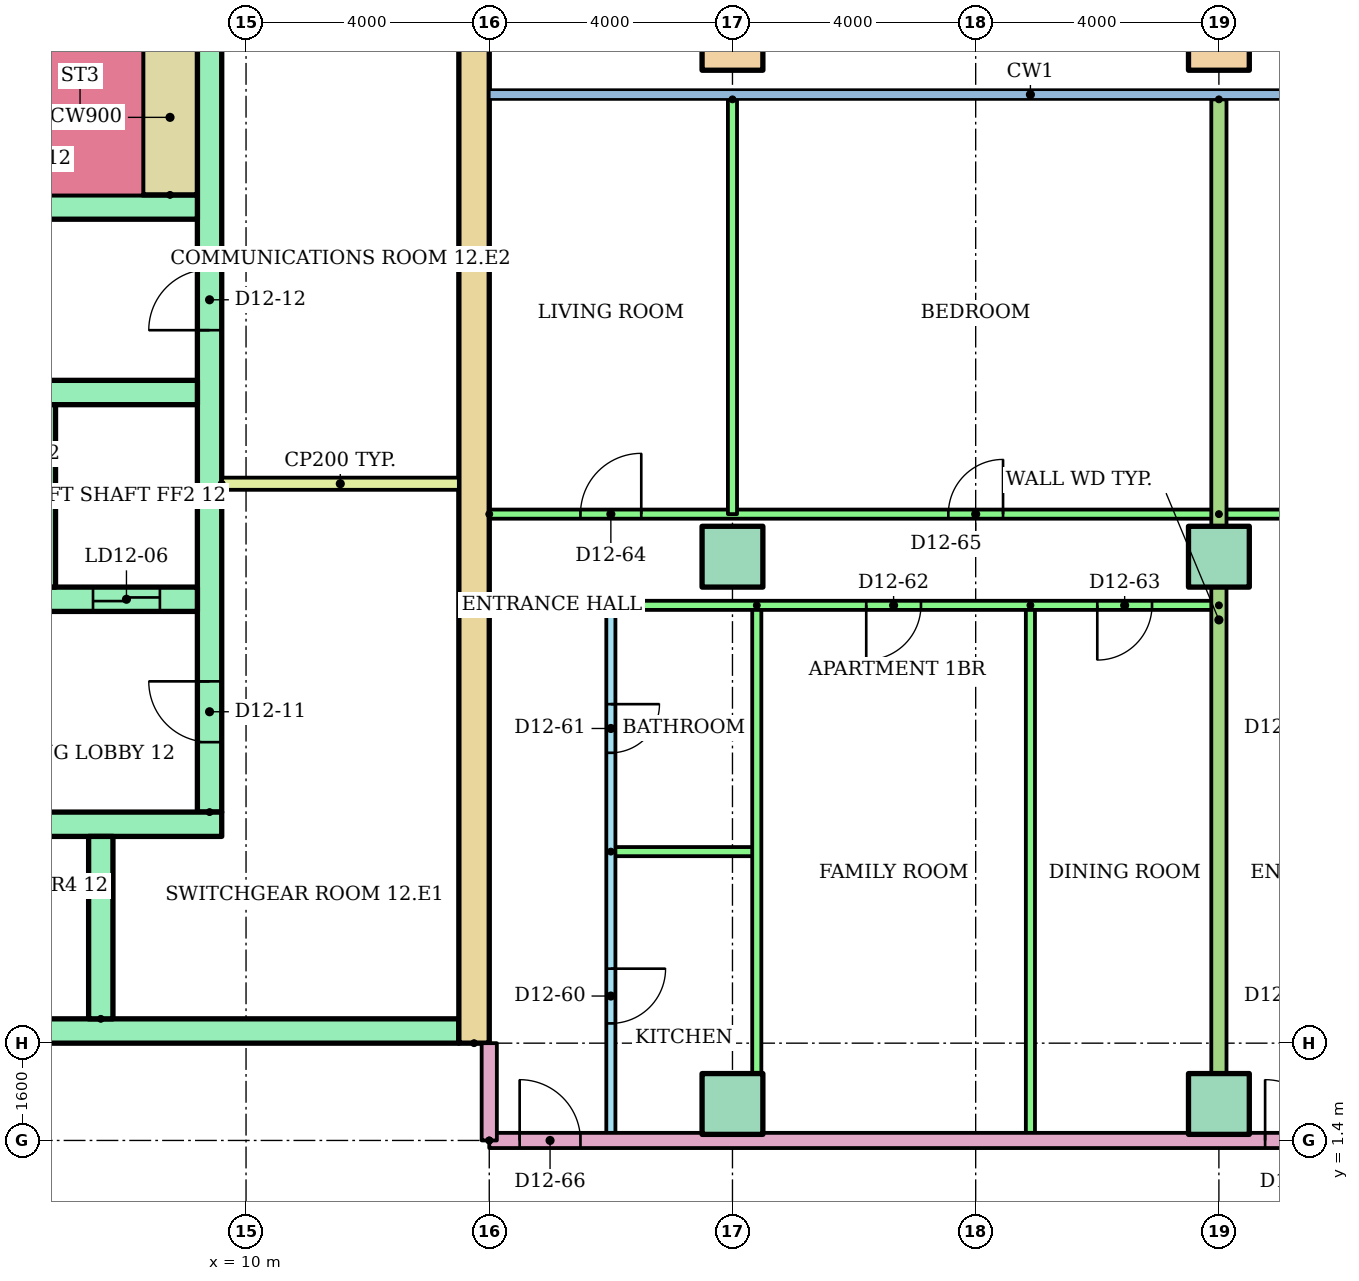
"""IFC4 building model, lengths in metres.
Left out: names, types, materials, properties, quantities, classifications, styles, units other than length and angle.
Written with IfcOpenShell. Run it as: python <this file> out.ifc"""

import sys

from ifc_helpers import new_model, si_unit, direction, frame, frame_2d, origin, origin_2d, place, context, subcontext, project, spatial, rectangle, hollow_rectangle, extrude, element, fill, save


model = new_model("IFC4")
c1 = context("Model", 3, precision=1e-05, world=origin(), true_north=direction((0.0, 1.0)))
c2 = subcontext(c1, "Body", "Model", "MODEL_VIEW")
j1 = project(units=[si_unit("LENGTHUNIT", "METRE"), si_unit("PLANEANGLEUNIT", "RADIAN")], contexts=[c1])
p1 = place(None, origin())
s1 = spatial("IfcSite", under=j1, at=p1, CompositionType="ELEMENT")
p2 = place(p1, origin())
s2 = spatial("IfcBuilding", under=s1, at=p2, CompositionType="ELEMENT")
p3 = place(p2, frame((0.0, 0.0, 48.0)))
s3 = spatial("IfcBuildingStorey", under=s2, at=p3, CompositionType="ELEMENT", Elevation=48.0)
for number, where in (
    (1, (18.0, 2.0, 0.0)),
    (2, (26.0, 2.0, 0.0)),
    (3, (18.0, 11.0, 0.0)),
    (4, (26.0, 11.0, 0.0)),
):
    element("IfcColumn", number, at=place(p3, frame(where)), inside=s3, PredefinedType="COLUMN", context=c2, shape_type="SweptSolid", body=[
        extrude(rectangle(XDim=1.0, YDim=1.0, at=origin_2d()), origin(), (0.0, 0.0, 1.0), 3.2),
    ])
for number, where in (
    (5, (18.0, 19.5, 0.0)),
    (6, (26.0, 19.5, 0.0)),
):
    element("IfcColumn", number, at=place(p3, frame(where)), inside=s3, PredefinedType="COLUMN", context=c2, shape_type="SweptSolid", body=[
        extrude(hollow_rectangle(XDim=1.0, YDim=1.0, WallThickness=0.05, at=origin_2d()), origin(), (0.0, 0.0, 1.0), 3.2),
    ])
p4 = place(p3, frame((13.75, 3.0, 0.0), z_axis=(0.0, 0.0, 1.0), x_axis=(0.0, 1.0, 0.0)))
e7 = element("IfcWall", 7, at=p4, inside=s3, PredefinedType="SHEAR", context=c2, shape_type="SweptSolid", body=[
    extrude(rectangle(XDim=17.0, YDim=0.5, at=frame_2d((8.5, 0.0))), origin(), (0.0, 0.0, 1.0), 2.92),
])
p5 = place(p3, frame((9.4, 6.8, 0.0), z_axis=(0.0, 0.0, 1.0), x_axis=(0.0, 1.0, 0.0)))
e8 = element("IfcWall", 8, at=p5, inside=s3, PredefinedType="SHEAR", context=c2, shape_type="SweptSolid", body=[
    extrude(rectangle(XDim=12.7, YDim=0.4, at=frame_2d((6.35, 0.0))), origin(), (0.0, 0.0, 1.0), 2.92),
])
p6 = place(p5, frame((1.15, 0.0, 0.0)))
e9 = element("IfcOpeningElement", 9, at=p6, cuts=e8, PredefinedType="OPENING", context=c2, shape_type="SweptSolid", body=[
    extrude(rectangle(XDim=1.0, YDim=2.1, at=frame_2d((0.5, 1.05))), frame((0.0, 0.21, 0.0), z_axis=(0.0, -1.0, 0.0), x_axis=(1.0, 0.0, 0.0)), (0.0, 0.0, 1.0), 0.42),
])
p7 = place(p5, frame((7.925, 0.0, 0.0)))
e10 = element("IfcOpeningElement", 10, at=p7, cuts=e8, PredefinedType="OPENING", context=c2, shape_type="SweptSolid", body=[
    extrude(rectangle(XDim=1.0, YDim=2.1, at=frame_2d((0.5, 1.05))), frame((0.0, 0.21, 0.0), z_axis=(0.0, -1.0, 0.0), x_axis=(1.0, 0.0, 0.0)), (0.0, 0.0, 1.0), 0.42),
])
p8 = place(p3, frame((-13.5, 3.2, 0.0)))
e11 = element("IfcWall", 11, at=p8, inside=s3, PredefinedType="SHEAR", context=c2, shape_type="SweptSolid", body=[
    extrude(rectangle(XDim=27.0, YDim=0.4, at=frame_2d((13.5, 0.0))), origin(), (0.0, 0.0, 1.0), 2.92),
])
p9 = place(p8, frame((6.861, 0.0, 0.0)))
e12 = element("IfcOpeningElement", 12, at=p9, cuts=e11, PredefinedType="OPENING", context=c2, shape_type="SweptSolid", body=[
    extrude(rectangle(XDim=1.1, YDim=2.1, at=frame_2d((0.55, 1.05))), frame((0.0, 0.21, 0.0), z_axis=(0.0, -1.0, 0.0), x_axis=(1.0, 0.0, 0.0)), (0.0, 0.0, 1.0), 0.42),
])
p10 = place(p8, frame((9.906, 0.0, 0.0)))
e13 = element("IfcOpeningElement", 13, at=p10, cuts=e11, PredefinedType="OPENING", context=c2, shape_type="SweptSolid", body=[
    extrude(rectangle(XDim=1.1, YDim=2.1, at=frame_2d((0.55, 1.05))), frame((0.0, 0.21, 0.0), z_axis=(0.0, -1.0, 0.0), x_axis=(1.0, 0.0, 0.0)), (0.0, 0.0, 1.0), 0.42),
])
p11 = place(p8, frame((15.994, 0.0, 0.0)))
e14 = element("IfcOpeningElement", 14, at=p11, cuts=e11, PredefinedType="OPENING", context=c2, shape_type="SweptSolid", body=[
    extrude(rectangle(XDim=1.1, YDim=2.1, at=frame_2d((0.55, 1.05))), frame((0.0, 0.21, 0.0), z_axis=(0.0, -1.0, 0.0), x_axis=(1.0, 0.0, 0.0)), (0.0, 0.0, 1.0), 0.42),
])
p12 = place(p8, frame((19.039, 0.0, 0.0)))
e15 = element("IfcOpeningElement", 15, at=p12, cuts=e11, PredefinedType="OPENING", context=c2, shape_type="SweptSolid", body=[
    extrude(rectangle(XDim=1.1, YDim=2.1, at=frame_2d((0.55, 1.05))), frame((0.0, 0.21, 0.0), z_axis=(0.0, -1.0, 0.0), x_axis=(1.0, 0.0, 0.0)), (0.0, 0.0, 1.0), 0.42),
])
p13 = place(p8, frame((12.6, 0.0, 0.0)))
e16 = element("IfcOpeningElement", 16, at=p13, cuts=e11, PredefinedType="OPENING", context=c2, shape_type="SweptSolid", body=[
    extrude(rectangle(XDim=1.8, YDim=2.1, at=frame_2d((0.9, 1.05))), frame((0.0, 0.21, 0.0), z_axis=(0.0, -1.0, 0.0), x_axis=(1.0, 0.0, 0.0)), (0.0, 0.0, 1.0), 0.42),
])
p14 = place(p3, frame((1.522, 6.6, 0.0)))
e17 = element("IfcWall", 17, at=p14, inside=s3, PredefinedType="SHEAR", context=c2, shape_type="SweptSolid", body=[
    extrude(rectangle(XDim=8.078, YDim=0.4, at=frame_2d((4.039, 0.0))), origin(), (0.0, 0.0, 1.0), 2.92),
])
p15 = place(p3, frame((7.611, 3.4, 0.0), z_axis=(0.0, 0.0, 1.0), x_axis=(0.0, 1.0, 0.0)))
e18 = element("IfcWall", 18, at=p15, inside=s3, PredefinedType="SHEAR", context=c2, shape_type="SweptSolid", body=[
    extrude(rectangle(XDim=3.0, YDim=0.4, at=frame_2d((1.5, 0.0))), origin(), (0.0, 0.0, 1.0), 2.92),
])
p16 = place(p3, frame((1.2, 10.3, 0.0)))
e19 = element("IfcWall", 19, at=p16, inside=s3, PredefinedType="SHEAR", context=c2, shape_type="SweptSolid", body=[
    extrude(rectangle(XDim=8.0, YDim=0.4, at=frame_2d((4.0, 0.0))), origin(), (0.0, 0.0, 1.0), 2.92),
])
p17 = place(p16, frame((3.55, 0.0, 0.0)))
e20 = element("IfcOpeningElement", 20, at=p17, cuts=e19, PredefinedType="OPENING", context=c2, shape_type="SweptSolid", body=[
    extrude(rectangle(XDim=1.1, YDim=2.1, at=frame_2d((0.55, 1.05))), frame((0.0, 0.21, 0.0), z_axis=(0.0, -1.0, 0.0), x_axis=(1.0, 0.0, 0.0)), (0.0, 0.0, 1.0), 0.42),
])
p18 = place(p16, frame((6.283, 0.0, 0.0)))
e21 = element("IfcOpeningElement", 21, at=p18, cuts=e19, PredefinedType="OPENING", context=c2, shape_type="SweptSolid", body=[
    extrude(rectangle(XDim=1.1, YDim=2.1, at=frame_2d((0.55, 1.05))), frame((0.0, 0.21, 0.0), z_axis=(0.0, -1.0, 0.0), x_axis=(1.0, 0.0, 0.0)), (0.0, 0.0, 1.0), 0.42),
])
p19 = place(p16, frame((0.867, 0.0, 0.0)))
e22 = element("IfcOpeningElement", 22, at=p19, cuts=e19, PredefinedType="OPENING", context=c2, shape_type="SweptSolid", body=[
    extrude(rectangle(XDim=1.0, YDim=2.1, at=frame_2d((0.5, 1.05))), frame((0.0, 0.21, 0.0), z_axis=(0.0, -1.0, 0.0), x_axis=(1.0, 0.0, 0.0)), (0.0, 0.0, 1.0), 0.42),
])
p20 = place(p3, frame((1.2, 13.7, 0.0)))
e23 = element("IfcWall", 23, at=p20, inside=s3, PredefinedType="SHEAR", context=c2, shape_type="SweptSolid", body=[
    extrude(rectangle(XDim=8.0, YDim=0.4, at=frame_2d((4.0, 0.0))), origin(), (0.0, 0.0, 1.0), 2.92),
])
p21 = place(p3, frame((6.667, 10.5, 0.0), z_axis=(0.0, 0.0, 1.0), x_axis=(0.0, 1.0, 0.0)))
e24 = element("IfcWall", 24, at=p21, inside=s3, PredefinedType="SHEAR", context=c2, shape_type="SweptSolid", body=[
    extrude(rectangle(XDim=3.0, YDim=0.4, at=frame_2d((1.5, 0.0))), origin(), (0.0, 0.0, 1.0), 2.92),
])
p22 = place(p3, frame((-9.2, 16.75, 0.0)))
e25 = element("IfcWall", 25, at=p22, inside=s3, PredefinedType="SHEAR", context=c2, shape_type="SweptSolid", body=[
    extrude(rectangle(XDim=18.4, YDim=0.4, at=frame_2d((9.2, 0.0))), origin(), (0.0, 0.0, 1.0), 2.92),
])
p23 = place(p22, frame((0.1, 0.0, 0.0)))
e26 = element("IfcOpeningElement", 26, at=p23, cuts=e25, PredefinedType="OPENING", context=c2, shape_type="SweptSolid", body=[
    extrude(rectangle(XDim=0.95, YDim=2.1, at=frame_2d((0.475, 1.05))), frame((0.0, 0.21, 0.0), z_axis=(0.0, -1.0, 0.0), x_axis=(1.0, 0.0, 0.0)), (0.0, 0.0, 1.0), 0.42),
])
p24 = place(p22, frame((6.1, 0.0, 0.0)))
e27 = element("IfcOpeningElement", 27, at=p24, cuts=e25, PredefinedType="OPENING", context=c2, shape_type="SweptSolid", body=[
    extrude(rectangle(XDim=0.95, YDim=2.1, at=frame_2d((0.475, 1.05))), frame((0.0, 0.21, 0.0), z_axis=(0.0, -1.0, 0.0), x_axis=(1.0, 0.0, 0.0)), (0.0, 0.0, 1.0), 0.42),
])
p25 = place(p22, frame((12.1, 0.0, 0.0)))
e28 = element("IfcOpeningElement", 28, at=p25, cuts=e25, PredefinedType="OPENING", context=c2, shape_type="SweptSolid", body=[
    extrude(rectangle(XDim=0.95, YDim=2.1, at=frame_2d((0.475, 1.05))), frame((0.0, 0.21, 0.0), z_axis=(0.0, -1.0, 0.0), x_axis=(1.0, 0.0, 0.0)), (0.0, 0.0, 1.0), 0.42),
])
p26 = place(p3, frame((8.75, 16.95, 0.0), z_axis=(0.0, 0.0, 1.0), x_axis=(0.0, 1.0, 0.0)))
e29 = element("IfcWall", 29, at=p26, inside=s3, PredefinedType="SHEAR", context=c2, shape_type="SweptSolid", body=[
    extrude(rectangle(XDim=2.55, YDim=0.9, at=frame_2d((1.275, 0.0))), origin(), (0.0, 0.0, 1.0), 2.92),
])
p27 = place(p3, frame((9.6, 12.2, 0.0)))
e30 = element("IfcWall", 30, at=p27, inside=s3, PredefinedType="PARTITIONING", context=c2, shape_type="SweptSolid", body=[
    extrude(rectangle(XDim=3.9, YDim=0.2, at=frame_2d((1.95, 0.0))), origin(), (0.0, 0.0, 1.0), 2.92),
])
p28 = place(p3, frame((16.0, 10.2, 0.0), z_axis=(0.0, 0.0, 1.0), x_axis=(0.0, -1.0, 0.0)))
e31 = element("IfcWall", 31, at=p28, inside=s3, PredefinedType="PARTITIONING", context=c2, shape_type="SweptSolid", body=[
    extrude(rectangle(XDim=8.8, YDim=0.15, at=frame_2d((4.4, 0.0))), origin(), (0.0, 0.0, 1.0), 2.4),
])
p29 = place(p28, frame((5.975, 0.0, 0.0)))
e32 = element("IfcOpeningElement", 32, at=p29, cuts=e31, PredefinedType="OPENING", context=c2, shape_type="SweptSolid", body=[
    extrude(rectangle(XDim=0.9, YDim=2.1, at=frame_2d((0.45, 1.05))), frame((0.0, 0.085, 0.0), z_axis=(0.0, -1.0, 0.0), x_axis=(1.0, 0.0, 0.0)), (0.0, 0.0, 1.0), 0.17),
])
p30 = place(p28, frame((1.625, 0.0, 0.0)))
e33 = element("IfcOpeningElement", 33, at=p30, cuts=e31, PredefinedType="OPENING", context=c2, shape_type="SweptSolid", body=[
    extrude(rectangle(XDim=0.8, YDim=2.1, at=frame_2d((0.4, 1.05))), frame((0.0, 0.085, 0.0), z_axis=(0.0, -1.0, 0.0), x_axis=(1.0, 0.0, 0.0)), (0.0, 0.0, 1.0), 0.17),
])
p31 = place(p3, frame((16.0, 6.15, 0.0)))
e34 = element("IfcWall", 34, at=p31, inside=s3, PredefinedType="PARTITIONING", context=c2, shape_type="SweptSolid", body=[
    extrude(rectangle(XDim=2.4, YDim=0.15, at=frame_2d((1.2, 0.0))), origin(), (0.0, 0.0, 1.0), 2.4),
])
for number, where, z_axis, x_axis in (
    (35, (18.4, 10.2, 0.0), (0.0, 0.0, 1.0), (0.0, -1.0, 0.0)),
    (36, (22.9, 10.2, 0.0), (0.0, 0.0, 1.0), (0.0, -1.0, 0.0)),
):
    element("IfcWall", number, at=place(p3, frame(where, z_axis=z_axis, x_axis=x_axis)), inside=s3, PredefinedType="PARTITIONING", context=c2, shape_type="SweptSolid", body=[
        extrude(rectangle(XDim=8.8, YDim=0.15, at=frame_2d((4.4, 0.0))), origin(), (0.0, 0.0, 1.0), 2.4),
    ])
p32 = place(p3, frame((26.0, 10.2, 0.0), z_axis=(0.0, 0.0, 1.0), x_axis=(-1.0, 0.0, 0.0)))
e37 = element("IfcWall", 37, at=p32, inside=s3, PredefinedType="PARTITIONING", context=c2, shape_type="SweptSolid", body=[
    extrude(rectangle(XDim=10.0, YDim=0.15, at=frame_2d((5.0, 0.0))), origin(), (0.0, 0.0, 1.0), 2.4),
])
p33 = place(p32, frame((4.9, 0.0, 0.0)))
e38 = element("IfcOpeningElement", 38, at=p33, cuts=e37, PredefinedType="OPENING", context=c2, shape_type="SweptSolid", body=[
    extrude(rectangle(XDim=0.9, YDim=2.1, at=frame_2d((0.45, 1.05))), frame((0.0, 0.085, 0.0), z_axis=(0.0, -1.0, 0.0), x_axis=(1.0, 0.0, 0.0)), (0.0, 0.0, 1.0), 0.17),
])
p34 = place(p32, frame((1.1, 0.0, 0.0)))
e39 = element("IfcOpeningElement", 39, at=p34, cuts=e37, PredefinedType="OPENING", context=c2, shape_type="SweptSolid", body=[
    extrude(rectangle(XDim=0.9, YDim=2.1, at=frame_2d((0.45, 1.05))), frame((0.0, 0.085, 0.0), z_axis=(0.0, -1.0, 0.0), x_axis=(1.0, 0.0, 0.0)), (0.0, 0.0, 1.0), 0.17),
])
p35 = place(p3, frame((14.0, 11.7, 0.0)))
e40 = element("IfcWall", 40, at=p35, inside=s3, PredefinedType="PARTITIONING", context=c2, shape_type="SweptSolid", body=[
    extrude(rectangle(XDim=12.0, YDim=0.15, at=frame_2d((6.0, 0.0))), origin(), (0.0, 0.0, 1.0), 2.4),
])
p36 = place(p35, frame((1.5, 0.0, 0.0)))
e41 = element("IfcOpeningElement", 41, at=p36, cuts=e40, PredefinedType="OPENING", context=c2, shape_type="SweptSolid", body=[
    extrude(rectangle(XDim=1.0, YDim=2.1, at=frame_2d((0.5, 1.05))), frame((0.0, 0.085, 0.0), z_axis=(0.0, -1.0, 0.0), x_axis=(1.0, 0.0, 0.0)), (0.0, 0.0, 1.0), 0.17),
])
p37 = place(p35, frame((7.55, 0.0, 0.0)))
e42 = element("IfcOpeningElement", 42, at=p37, cuts=e40, PredefinedType="OPENING", context=c2, shape_type="SweptSolid", body=[
    extrude(rectangle(XDim=0.9, YDim=2.1, at=frame_2d((0.45, 1.05))), frame((0.0, 0.085, 0.0), z_axis=(0.0, -1.0, 0.0), x_axis=(1.0, 0.0, 0.0)), (0.0, 0.0, 1.0), 0.17),
])
p38 = place(p3, frame((18.0, 18.521, 0.0), z_axis=(0.0, 0.0, 1.0), x_axis=(0.0, -1.0, 0.0)))
e43 = element("IfcWall", 43, at=p38, inside=s3, PredefinedType="PARTITIONING", context=c2, shape_type="SweptSolid", body=[
    extrude(rectangle(XDim=6.821, YDim=0.15, at=frame_2d((3.411, 0.0))), origin(), (0.0, 0.0, 1.0), 2.4),
])
p39 = place(p3, frame((26.0, 11.7, 0.0)))
e44 = element("IfcWall", 44, at=p39, inside=s3, PredefinedType="PARTITIONING", context=c2, shape_type="SweptSolid", body=[
    extrude(rectangle(XDim=10.52, YDim=0.15, at=frame_2d((5.26, 0.0))), origin(), (0.0, 0.0, 1.0), 2.4),
])
p40 = place(p39, frame((2.4, 0.0, 0.0)))
e45 = element("IfcOpeningElement", 45, at=p40, cuts=e44, PredefinedType="OPENING", context=c2, shape_type="SweptSolid", body=[
    extrude(rectangle(XDim=1.0, YDim=2.1, at=frame_2d((0.5, 1.05))), frame((0.0, 0.085, 0.0), z_axis=(0.0, -1.0, 0.0), x_axis=(1.0, 0.0, 0.0)), (0.0, 0.0, 1.0), 0.17),
])
p41 = place(p39, frame((8.76, 0.0, 0.0)))
e46 = element("IfcOpeningElement", 46, at=p41, cuts=e44, PredefinedType="OPENING", context=c2, shape_type="SweptSolid", body=[
    extrude(rectangle(XDim=1.0, YDim=2.1, at=frame_2d((0.5, 1.05))), frame((0.0, 0.085, 0.0), z_axis=(0.0, -1.0, 0.0), x_axis=(1.0, 0.0, 0.0)), (0.0, 0.0, 1.0), 0.17),
])
p42 = place(p3, frame((26.0, 18.521, 0.0), z_axis=(0.0, 0.0, 1.0), x_axis=(0.0, -1.0, 0.0)))
e47 = element("IfcWall", 47, at=p42, inside=s3, PredefinedType="PARTITIONING", context=c2, shape_type="SweptSolid", body=[
    extrude(rectangle(XDim=17.121, YDim=0.25, at=frame_2d((8.561, 0.0))), origin(), (0.0, 0.0, 1.0), 2.4),
])
p43 = place(p3, frame((14.0, 1.4, 0.0)))
e48 = element("IfcWall", 48, at=p43, inside=s3, PredefinedType="PARTITIONING", context=c2, shape_type="SweptSolid", body=[
    extrude(rectangle(XDim=15.0, YDim=0.25, at=frame_2d((7.5, 0.0))), origin(), (0.0, 0.0, 1.0), 2.4),
])
p44 = place(p43, frame((0.5, 0.0, 0.0)))
e49 = element("IfcOpeningElement", 49, at=p44, cuts=e48, PredefinedType="OPENING", context=c2, shape_type="SweptSolid", body=[
    extrude(rectangle(XDim=1.0, YDim=2.1, at=frame_2d((0.5, 1.05))), frame((0.0, 0.135, 0.0), z_axis=(0.0, -1.0, 0.0), x_axis=(1.0, 0.0, 0.0)), (0.0, 0.0, 1.0), 0.27),
])
p45 = place(p43, frame((12.76, 0.0, 0.0)))
e50 = element("IfcOpeningElement", 50, at=p45, cuts=e48, PredefinedType="OPENING", context=c2, shape_type="SweptSolid", body=[
    extrude(rectangle(XDim=1.0, YDim=2.1, at=frame_2d((0.5, 1.05))), frame((0.0, 0.135, 0.0), z_axis=(0.0, -1.0, 0.0), x_axis=(1.0, 0.0, 0.0)), (0.0, 0.0, 1.0), 0.27),
])
p46 = place(p3, frame((14.0, 1.4, 0.0), z_axis=(0.0, 0.0, 1.0), x_axis=(0.0, 1.0, 0.0)))
e51 = element("IfcWall", 51, at=p46, inside=s3, PredefinedType="PARTITIONING", context=c2, shape_type="SweptSolid", body=[
    extrude(rectangle(XDim=1.6, YDim=0.25, at=frame_2d((0.8, 0.0))), origin(), (0.0, 0.0, 1.0), 2.4),
])
p47 = place(p18, origin())
e52 = element("IfcDoor", 52, at=p47, inside=s3, OperationType="SLIDING_TO_LEFT", PredefinedType="DOOR", context=c2, shape_type="SweptSolid", body=[
    extrude(rectangle(XDim=1.1, YDim=2.1, at=frame_2d((0.55, 1.05))), frame((0.0, 0.025, 0.0), z_axis=(0.0, -1.0, 0.0), x_axis=(1.0, 0.0, 0.0)), (0.0, 0.0, 1.0), 0.05),
])
fill(e21, e52)
p48 = place(p6, origin())
e53 = element("IfcDoor", 53, at=p48, inside=s3, OperationType="SINGLE_SWING_RIGHT", PredefinedType="DOOR", context=c2, shape_type="SweptSolid", body=[
    extrude(rectangle(XDim=1.0, YDim=2.1, at=frame_2d((0.5, 1.05))), frame((0.0, 0.025, 0.0), z_axis=(0.0, -1.0, 0.0), x_axis=(1.0, 0.0, 0.0)), (0.0, 0.0, 1.0), 0.05),
])
fill(e9, e53)
p49 = place(p7, origin())
e54 = element("IfcDoor", 54, at=p49, inside=s3, OperationType="SINGLE_SWING_LEFT", PredefinedType="DOOR", context=c2, shape_type="SweptSolid", body=[
    extrude(rectangle(XDim=1.0, YDim=2.1, at=frame_2d((0.5, 1.05))), frame((0.0, 0.025, 0.0), z_axis=(0.0, -1.0, 0.0), x_axis=(1.0, 0.0, 0.0)), (0.0, 0.0, 1.0), 0.05),
])
fill(e10, e54)
p50 = place(p29, origin())
e55 = element("IfcDoor", 55, at=p50, inside=s3, OperationType="SINGLE_SWING_LEFT", PredefinedType="DOOR", context=c2, shape_type="SweptSolid", body=[
    extrude(rectangle(XDim=0.9, YDim=2.1, at=frame_2d((0.45, 1.05))), frame((0.0, 0.025, 0.0), z_axis=(0.0, -1.0, 0.0), x_axis=(1.0, 0.0, 0.0)), (0.0, 0.0, 1.0), 0.05),
])
fill(e32, e55)
p51 = place(p30, origin())
e56 = element("IfcDoor", 56, at=p51, inside=s3, OperationType="SINGLE_SWING_LEFT", PredefinedType="DOOR", context=c2, shape_type="SweptSolid", body=[
    extrude(rectangle(XDim=0.8, YDim=2.1, at=frame_2d((0.4, 1.05))), frame((0.0, 0.025, 0.0), z_axis=(0.0, -1.0, 0.0), x_axis=(1.0, 0.0, 0.0)), (0.0, 0.0, 1.0), 0.05),
])
fill(e33, e56)
p52 = place(p33, origin())
e57 = element("IfcDoor", 57, at=p52, inside=s3, OperationType="SINGLE_SWING_RIGHT", PredefinedType="DOOR", context=c2, shape_type="SweptSolid", body=[
    extrude(rectangle(XDim=0.9, YDim=2.1, at=frame_2d((0.45, 1.05))), frame((0.0, 0.025, 0.0), z_axis=(0.0, -1.0, 0.0), x_axis=(1.0, 0.0, 0.0)), (0.0, 0.0, 1.0), 0.05),
])
fill(e38, e57)
p53 = place(p34, origin())
e58 = element("IfcDoor", 58, at=p53, inside=s3, OperationType="SINGLE_SWING_RIGHT", PredefinedType="DOOR", context=c2, shape_type="SweptSolid", body=[
    extrude(rectangle(XDim=0.9, YDim=2.1, at=frame_2d((0.45, 1.05))), frame((0.0, 0.025, 0.0), z_axis=(0.0, -1.0, 0.0), x_axis=(1.0, 0.0, 0.0)), (0.0, 0.0, 1.0), 0.05),
])
fill(e39, e58)
p54 = place(p36, origin())
e59 = element("IfcDoor", 59, at=p54, inside=s3, OperationType="SINGLE_SWING_RIGHT", PredefinedType="DOOR", context=c2, shape_type="SweptSolid", body=[
    extrude(rectangle(XDim=1.0, YDim=2.1, at=frame_2d((0.5, 1.05))), frame((0.0, 0.025, 0.0), z_axis=(0.0, -1.0, 0.0), x_axis=(1.0, 0.0, 0.0)), (0.0, 0.0, 1.0), 0.05),
])
fill(e41, e59)
p55 = place(p37, origin())
e60 = element("IfcDoor", 60, at=p55, inside=s3, OperationType="SINGLE_SWING_RIGHT", PredefinedType="DOOR", context=c2, shape_type="SweptSolid", body=[
    extrude(rectangle(XDim=0.9, YDim=2.1, at=frame_2d((0.45, 1.05))), frame((0.0, 0.025, 0.0), z_axis=(0.0, -1.0, 0.0), x_axis=(1.0, 0.0, 0.0)), (0.0, 0.0, 1.0), 0.05),
])
fill(e42, e60)
p56 = place(p44, origin())
e61 = element("IfcDoor", 61, at=p56, inside=s3, OperationType="SINGLE_SWING_LEFT", PredefinedType="DOOR", context=c2, shape_type="SweptSolid", body=[
    extrude(rectangle(XDim=1.0, YDim=2.1, at=frame_2d((0.5, 1.05))), frame((0.0, 0.025, 0.0), z_axis=(0.0, -1.0, 0.0), x_axis=(1.0, 0.0, 0.0)), (0.0, 0.0, 1.0), 0.05),
])
fill(e49, e61)
p57 = place(p45, origin())
e62 = element("IfcDoor", 62, at=p57, inside=s3, OperationType="SINGLE_SWING_LEFT", PredefinedType="DOOR", context=c2, shape_type="SweptSolid", body=[
    extrude(rectangle(XDim=1.0, YDim=2.1, at=frame_2d((0.5, 1.05))), frame((0.0, 0.025, 0.0), z_axis=(0.0, -1.0, 0.0), x_axis=(1.0, 0.0, 0.0)), (0.0, 0.0, 1.0), 0.05),
])
fill(e50, e62)
save(model, sys.argv[1])
